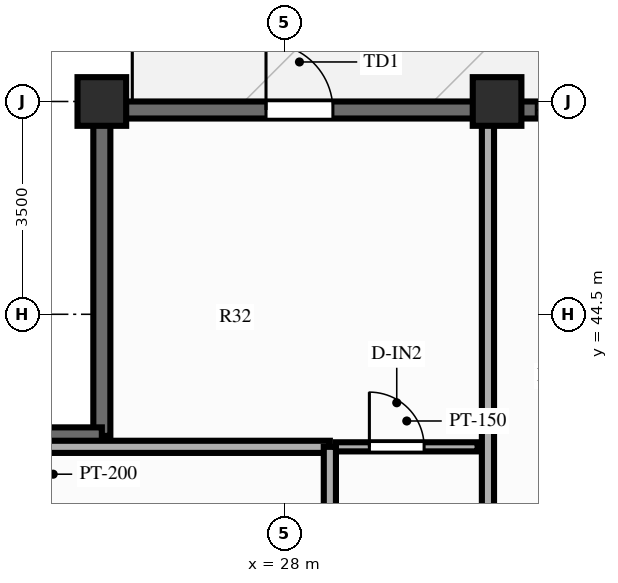
"""IFC4 building model, lengths in metres.
Left out: names, types, materials, properties, quantities, classifications, styles, units other than length and angle.
Written with IfcOpenShell. Run it as: python <this file> out.ifc"""

import sys

from ifc_helpers import new_model, si_unit, direction, frame, frame_2d, origin, origin_2d, place, context, subcontext, project, spatial, rectangle, extrude, source, transform, mapped, element, fill, save


model = new_model("IFC4")
c1 = context("Model", 3, precision=1e-05, world=origin(), true_north=direction((0.0, 1.0)))
c2 = subcontext(c1, "Body", "Model", "MODEL_VIEW")
j1 = project(units=[si_unit("LENGTHUNIT", "METRE"), si_unit("PLANEANGLEUNIT", "RADIAN")], contexts=[c1])
p1 = place(None, origin())
s1 = spatial("IfcSite", under=j1, at=p1, CompositionType="ELEMENT")
p2 = place(p1, origin())
s2 = spatial("IfcBuilding", under=s1, at=p2, CompositionType="ELEMENT")
p3 = place(p2, frame((0.0, 0.0, 202.6)))
s3 = spatial("IfcBuildingStorey", under=s2, at=p3, CompositionType="ELEMENT", Elevation=202.6)
m1 = source(origin(), c2, "Body", "SweptSolid", [
    extrude(rectangle(XDim=0.8, YDim=0.8, at=origin_2d()), origin(), (0.0, 0.0, 1.0), 3.9),
])
for number, where, z_axis, x_axis in (
    (1, (31.5, 48.0, 0.0), (0.0, 0.0, 1.0), (1.0, 0.0, 0.0)),
    (2, (25.0, 48.0, 0.0), (0.0, 0.0, 1.0), (1.0, 0.0, 0.0)),
):
    element("IfcColumn", number, at=place(p3, frame(where, z_axis=z_axis, x_axis=x_axis)), inside=s3, PredefinedType="COLUMN", context=c2, shape_type="MappedRepresentation", body=[
        mapped(m1, transform((0.0, 0.0, 0.0), scale=1.0)),
    ])
p4 = place(p3, frame((25.0, 47.86, 0.0), z_axis=(0.0, 0.0, 1.0), x_axis=(1.0, 0.0, 0.0)))
e3 = element("IfcWall", 3, at=p4, inside=s3, PredefinedType="SOLIDWALL", context=c2, shape_type="SweptSolid", body=[
    extrude(rectangle(XDim=26.0, YDim=0.28, at=frame_2d((13.0, 0.0))), origin(), (0.0, 0.0, 1.0), 2.79),
])
p5 = place(p4, frame((2.7, 0.0, 0.0)))
e4 = element("IfcOpeningElement", 4, at=p5, cuts=e3, PredefinedType="OPENING", context=c2, shape_type="SweptSolid", body=[
    extrude(rectangle(XDim=1.1, YDim=2.15, at=frame_2d((0.55, 1.075))), frame((0.0, 0.152, 0.0), z_axis=(0.0, -1.0, 0.0), x_axis=(1.0, 0.0, 0.0)), (0.0, 0.0, 1.0), 0.304),
])
p6 = place(p4, frame((7.145, 0.0, 0.85)))
e5 = element("IfcOpeningElement", 5, at=p6, cuts=e3, PredefinedType="OPENING", context=c2, shape_type="SweptSolid", body=[
    extrude(rectangle(XDim=0.95, YDim=1.5, at=frame_2d((0.475, 0.75))), frame((0.0, 0.152, 0.0), z_axis=(0.0, -1.0, 0.0), x_axis=(1.0, 0.0, 0.0)), (0.0, 0.0, 1.0), 0.304),
])
p7 = place(p4, frame((9.032, 0.0, 0.85)))
e6 = element("IfcOpeningElement", 6, at=p7, cuts=e3, PredefinedType="OPENING", context=c2, shape_type="SweptSolid", body=[
    extrude(rectangle(XDim=1.5, YDim=1.65, at=frame_2d((0.75, 0.825))), frame((0.0, 0.152, 0.0), z_axis=(0.0, -1.0, 0.0), x_axis=(1.0, 0.0, 0.0)), (0.0, 0.0, 1.0), 0.304),
])
p8 = place(p4, frame((11.67, 0.0, 0.85)))
e7 = element("IfcOpeningElement", 7, at=p8, cuts=e3, PredefinedType="OPENING", context=c2, shape_type="SweptSolid", body=[
    extrude(rectangle(XDim=1.8, YDim=1.65, at=frame_2d((0.9, 0.825))), frame((0.0, 0.152, 0.0), z_axis=(0.0, -1.0, 0.0), x_axis=(1.0, 0.0, 0.0)), (0.0, 0.0, 1.0), 0.304),
])
p9 = place(p4, frame((14.68, 0.0, 0.85)))
e8 = element("IfcOpeningElement", 8, at=p9, cuts=e3, PredefinedType="OPENING", context=c2, shape_type="SweptSolid", body=[
    extrude(rectangle(XDim=1.8, YDim=1.65, at=frame_2d((0.9, 0.825))), frame((0.0, 0.152, 0.0), z_axis=(0.0, -1.0, 0.0), x_axis=(1.0, 0.0, 0.0)), (0.0, 0.0, 1.0), 0.304),
])
p10 = place(p4, frame((17.573, 0.0, 0.85)))
e9 = element("IfcOpeningElement", 9, at=p10, cuts=e3, PredefinedType="OPENING", context=c2, shape_type="SweptSolid", body=[
    extrude(rectangle(XDim=1.2, YDim=1.5, at=frame_2d((0.6, 0.75))), frame((0.0, 0.152, 0.0), z_axis=(0.0, -1.0, 0.0), x_axis=(1.0, 0.0, 0.0)), (0.0, 0.0, 1.0), 0.304),
])
p11 = place(p4, frame((21.85, 0.0, 0.85)))
e10 = element("IfcOpeningElement", 10, at=p11, cuts=e3, PredefinedType="OPENING", context=c2, shape_type="SweptSolid", body=[
    extrude(rectangle(XDim=1.8, YDim=1.65, at=frame_2d((0.9, 0.825))), frame((0.0, 0.152, 0.0), z_axis=(0.0, -1.0, 0.0), x_axis=(1.0, 0.0, 0.0)), (0.0, 0.0, 1.0), 0.304),
])
for number, where, z_axis, x_axis in (
    (11, (25.0, 42.5, 0.0), (0.0, 0.0, 1.0), (0.0, 1.0, 0.0)),
    (12, (19.58, 42.5, 0.0), (0.0, 0.0, 1.0), (1.0, 0.0, 0.0)),
):
    element("IfcWall", number, at=place(p3, frame(where, z_axis=z_axis, x_axis=x_axis)), inside=s3, PredefinedType="SOLIDWALL", context=c2, shape_type="SweptSolid", body=[
        extrude(rectangle(XDim=5.42, YDim=0.28, at=frame_2d((2.71, 0.0))), origin(), (0.0, 0.0, 1.0), 2.79),
    ])
p12 = place(p3, frame((28.85, 42.32, 0.0), z_axis=(0.0, 0.0, 1.0), x_axis=(1.0, 0.0, 0.0)))
e13 = element("IfcWall", 13, at=p12, inside=s3, PredefinedType="PARTITIONING", context=c2, shape_type="SweptSolid", body=[
    extrude(rectangle(XDim=2.33, YDim=0.15, at=frame_2d((1.165, 0.0))), origin(), (0.0, 0.0, 1.0), 3.6),
])
p13 = place(p12, frame((0.55, 0.0, 0.0)))
e14 = element("IfcOpeningElement", 14, at=p13, cuts=e13, PredefinedType="OPENING", context=c2, shape_type="SweptSolid", body=[
    extrude(rectangle(XDim=0.9, YDim=2.1, at=frame_2d((0.45, 1.05))), frame((0.0, 0.087, 0.0), z_axis=(0.0, -1.0, 0.0), x_axis=(1.0, 0.0, 0.0)), (0.0, 0.0, 1.0), 0.174),
])
p14 = place(p3, frame((31.35, 39.05, 0.0), z_axis=(0.0, 0.0, 1.0), x_axis=(0.0, 1.0, 0.0)))
e15 = element("IfcWall", 15, at=p14, inside=s3, PredefinedType="PARTITIONING", context=c2, shape_type="SweptSolid", body=[
    extrude(rectangle(XDim=8.8, YDim=0.2, at=frame_2d((4.4, 0.0))), origin(), (0.0, 0.0, 1.0), 2.79),
])
p15 = place(p3, frame((28.75, 42.32, 0.0), z_axis=(0.0, 0.0, 1.0), x_axis=(-1.0, 0.0, 0.0)))
e16 = element("IfcWall", 16, at=p15, inside=s3, PredefinedType="PARTITIONING", context=c2, shape_type="SweptSolid", body=[
    extrude(rectangle(XDim=9.1, YDim=0.2, at=frame_2d((4.55, 0.0))), origin(), (0.0, 0.0, 1.0), 3.6),
])
p16 = place(p3, frame((28.75, 38.429, 0.0), z_axis=(0.0, 0.0, 1.0), x_axis=(0.0, 1.0, 0.0)))
e17 = element("IfcWall", 17, at=p16, inside=s3, PredefinedType="PARTITIONING", context=c2, shape_type="SweptSolid", body=[
    extrude(rectangle(XDim=3.891, YDim=0.2, at=frame_2d((1.945, 0.0))), origin(), (0.0, 0.0, 1.0), 3.6),
])
p17 = place(p16, frame((1.445, 0.0, 0.0)))
e18 = element("IfcOpeningElement", 18, at=p17, cuts=e17, PredefinedType="OPENING", context=c2, shape_type="SweptSolid", body=[
    extrude(rectangle(XDim=1.0, YDim=2.15, at=frame_2d((0.5, 1.075))), frame((0.0, 0.112, 0.0), z_axis=(0.0, -1.0, 0.0), x_axis=(1.0, 0.0, 0.0)), (0.0, 0.0, 1.0), 0.224),
])
m2 = source(origin(), c2, "Body", "SweptSolid", [
    extrude(rectangle(XDim=1.1, YDim=2.15, at=frame_2d((0.55, 1.075))), frame((0.0, 0.025, 0.0), z_axis=(0.0, -1.0, 0.0), x_axis=(1.0, 0.0, 0.0)), (0.0, 0.0, 1.0), 0.05),
])
p18 = place(p5, origin())
e19 = element("IfcDoor", 19, at=p18, inside=s3, OperationType="SINGLE_SWING_LEFT", PredefinedType="DOOR", context=c2, shape_type="MappedRepresentation", body=[
    mapped(m2, transform((0.0, 0.0, 0.0), scale=1.0)),
])
fill(e4, e19)
m3 = source(origin(), c2, "Body", "SweptSolid", [
    extrude(rectangle(XDim=0.95, YDim=1.5, at=frame_2d((0.475, 0.75))), frame((0.0, 0.03, 0.0), z_axis=(0.0, -1.0, 0.0), x_axis=(1.0, 0.0, 0.0)), (0.0, 0.0, 1.0), 0.06),
])
p19 = place(p6, origin())
e20 = element("IfcWindow", 20, at=p19, inside=s3, PartitioningType="SINGLE_PANEL", PredefinedType="WINDOW", context=c2, shape_type="MappedRepresentation", body=[
    mapped(m3, transform((0.0, 0.0, 0.0), scale=1.0)),
])
fill(e5, e20)
m4 = source(origin(), c2, "Body", "SweptSolid", [
    extrude(rectangle(XDim=0.9, YDim=2.1, at=frame_2d((0.45, 1.05))), frame((0.0, 0.025, 0.0), z_axis=(0.0, -1.0, 0.0), x_axis=(1.0, 0.0, 0.0)), (0.0, 0.0, 1.0), 0.05),
])
p20 = place(p13, origin())
e21 = element("IfcDoor", 21, at=p20, inside=s3, OperationType="SINGLE_SWING_LEFT", PredefinedType="DOOR", context=c2, shape_type="MappedRepresentation", body=[
    mapped(m4, transform((0.0, 0.0, 0.0), scale=1.0)),
])
fill(e14, e21)
save(model, sys.argv[1])
